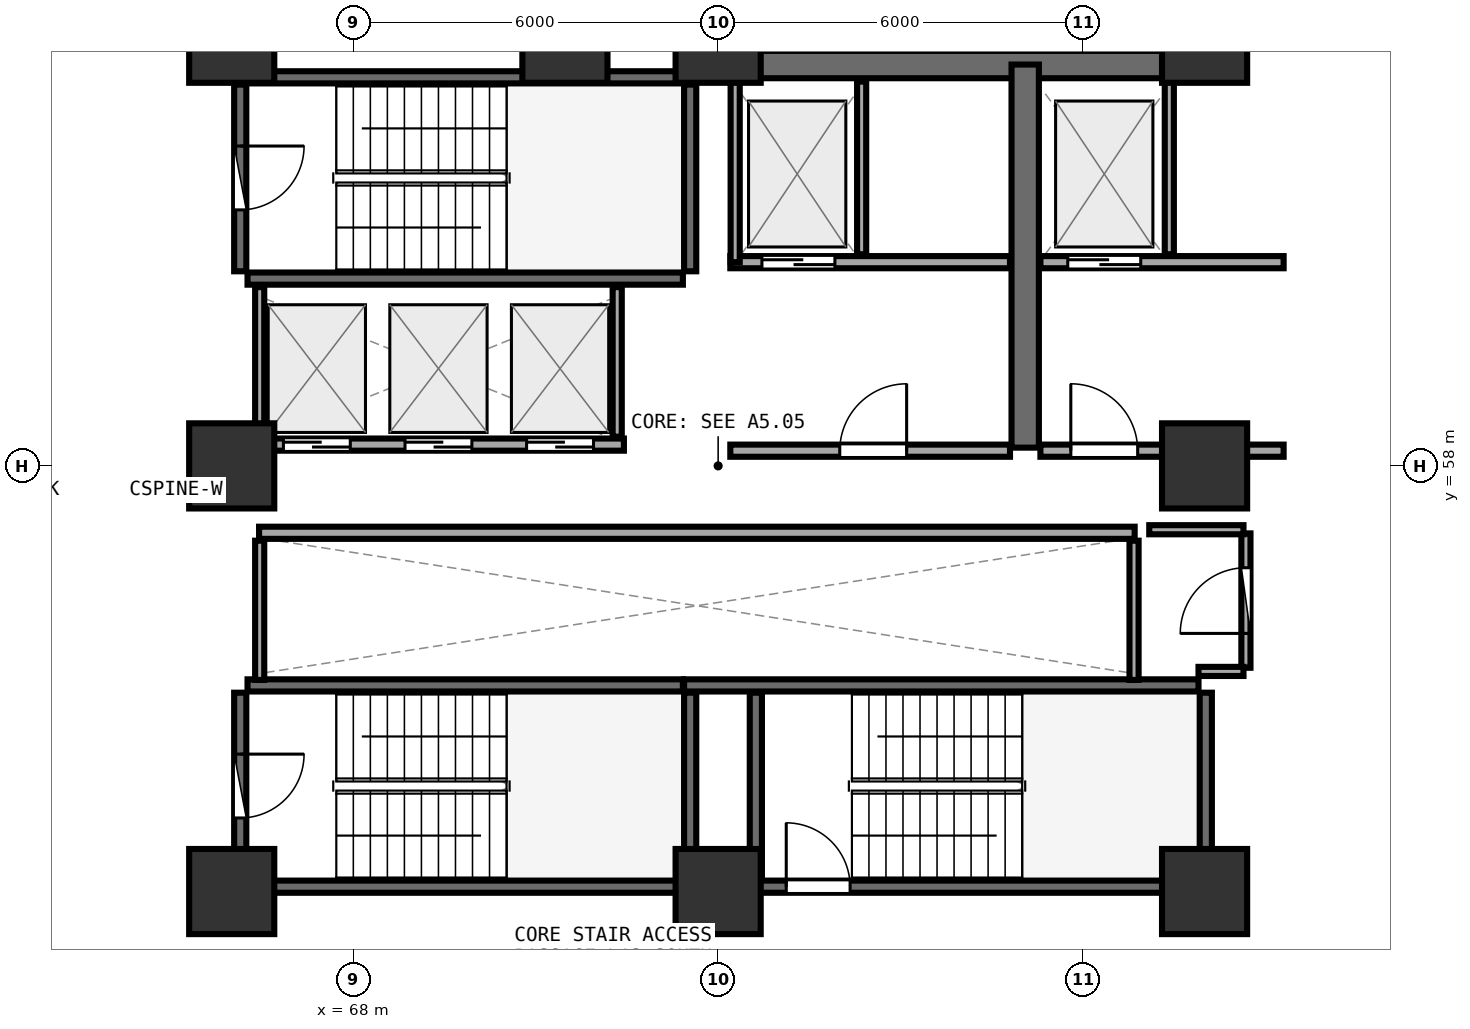
"""IFC4 building model, lengths in metres.
Left out: names, types, materials, properties, quantities, classifications, styles, units other than length and angle.
Written with IfcOpenShell. Run it as: python <this file> out.ifc"""

import sys

from ifc_helpers import new_model, si_unit, direction, frame, frame_2d, origin, origin_2d, place, context, subcontext, project, spatial, rectangle, extrude, element, fill, save


model = new_model("IFC4")
c1 = context("Model", 3, precision=1e-05, world=origin(), true_north=direction((0.0, 1.0)))
c2 = subcontext(c1, "Body", "Model", "MODEL_VIEW")
j1 = project(units=[si_unit("LENGTHUNIT", "METRE"), si_unit("PLANEANGLEUNIT", "RADIAN")], contexts=[c1])
p1 = place(None, origin())
s1 = spatial("IfcSite", under=j1, at=p1, CompositionType="ELEMENT")
p2 = place(p1, origin())
s2 = spatial("IfcBuilding", under=s1, at=p2, CompositionType="ELEMENT")
p3 = place(p2, frame((0.0, 0.0, 52.5)))
s3 = spatial("IfcBuildingStorey", under=s2, at=p3, CompositionType="ELEMENT", Elevation=52.5)
for number, where, z_axis, x_axis in (
    (1, (66.0, 51.0, 0.0), (0.0, 0.0, 1.0), (1.0, 0.0, 0.0)),
    (2, (74.0, 51.0, 0.0), (0.0, 0.0, 1.0), (1.0, 0.0, 0.0)),
    (3, (82.0, 51.0, 0.0), (0.0, 0.0, 1.0), (1.0, 0.0, 0.0)),
    (4, (82.0, 58.0, 0.0), (0.0, 0.0, 1.0), (1.0, 0.0, 0.0)),
    (5, (82.0, 65.0, 0.0), (0.0, 0.0, 1.0), (1.0, 0.0, 0.0)),
    (6, (74.0, 65.0, 0.0), (0.0, 0.0, 1.0), (1.0, 0.0, 0.0)),
    (7, (71.48, 65.0, 0.0), (0.0, 0.0, 1.0), (1.0, 0.0, 0.0)),
    (8, (66.0, 65.0, 0.0), (0.0, 0.0, 1.0), (1.0, 0.0, 0.0)),
    (9, (66.0, 58.0, 0.0), (0.0, 0.0, 1.0), (1.0, 0.0, 0.0)),
):
    element("IfcColumn", number, at=place(p3, frame(where, z_axis=z_axis, x_axis=x_axis)), inside=s3, PredefinedType="PILASTER", context=c2, shape_type="SweptSolid", body=[
        extrude(rectangle(XDim=1.4, YDim=1.4, at=origin_2d()), origin(), (0.0, 0.0, 1.0), 3.75),
    ])
p4 = place(p3, frame((66.26, 61.08, 0.0), z_axis=(0.0, 0.0, 1.0), x_axis=(1.0, 0.0, 0.0)))
e10 = element("IfcWall", 10, at=p4, inside=s3, PredefinedType="SHEAR", context=c2, shape_type="SweptSolid", body=[
    extrude(rectangle(XDim=7.16, YDim=0.2, at=frame_2d((3.58, 0.0))), origin(), (0.0, 0.0, 1.0), 3.49),
])
p5 = place(p3, frame((73.54, 61.2, 0.0), z_axis=(0.0, 0.0, 1.0), x_axis=(0.0, 1.0, 0.0)))
e11 = element("IfcWall", 11, at=p5, inside=s3, PredefinedType="SHEAR", context=c2, shape_type="SweptSolid", body=[
    extrude(rectangle(XDim=3.07, YDim=0.2, at=frame_2d((1.535, 0.0))), origin(), (0.0, 0.0, 1.0), 3.49),
])
p6 = place(p3, frame((73.42, 64.39, 0.0), z_axis=(0.0, 0.0, 1.0), x_axis=(-1.0, 0.0, 0.0)))
e12 = element("IfcWall", 12, at=p6, inside=s3, PredefinedType="SHEAR", context=c2, shape_type="SweptSolid", body=[
    extrude(rectangle(XDim=7.16, YDim=0.2, at=frame_2d((3.58, 0.0))), origin(), (0.0, 0.0, 1.0), 3.49),
])
p7 = place(p3, frame((66.14, 64.27, 0.0), z_axis=(0.0, 0.0, 1.0), x_axis=(0.0, -1.0, 0.0)))
e13 = element("IfcWall", 13, at=p7, inside=s3, PredefinedType="SHEAR", context=c2, shape_type="SweptSolid", body=[
    extrude(rectangle(XDim=3.07, YDim=0.2, at=frame_2d((1.535, 0.0))), origin(), (0.0, 0.0, 1.0), 3.49),
])
p8 = place(p7, frame((1.01, 0.0, 0.0)))
e14 = element("IfcOpeningElement", 14, at=p8, cuts=e13, PredefinedType="OPENING", context=c2, shape_type="SweptSolid", body=[
    extrude(rectangle(XDim=1.05, YDim=2.1, at=frame_2d((0.525, 1.05))), frame((0.0, 0.11, 0.0), z_axis=(0.0, -1.0, 0.0), x_axis=(1.0, 0.0, 0.0)), (0.0, 0.0, 1.0), 0.22),
])
p9 = place(p3, frame((74.0, 51.08, 0.0), z_axis=(0.0, 0.0, 1.0), x_axis=(1.0, 0.0, 0.0)))
e15 = element("IfcWall", 15, at=p9, inside=s3, PredefinedType="SHEAR", context=c2, shape_type="SweptSolid", body=[
    extrude(rectangle(XDim=7.9, YDim=0.2, at=frame_2d((3.95, 0.0))), origin(), (0.0, 0.0, 1.0), 3.49),
])
p10 = place(p9, frame((1.12, 0.0, 0.0)))
e16 = element("IfcOpeningElement", 16, at=p10, cuts=e15, PredefinedType="OPENING", context=c2, shape_type="SweptSolid", body=[
    extrude(rectangle(XDim=1.05, YDim=2.1, at=frame_2d((0.525, 1.05))), frame((0.0, 0.11, 0.0), z_axis=(0.0, -1.0, 0.0), x_axis=(1.0, 0.0, 0.0)), (0.0, 0.0, 1.0), 0.22),
])
p11 = place(p3, frame((82.02, 51.2, 0.0), z_axis=(0.0, 0.0, 1.0), x_axis=(0.0, 1.0, 0.0)))
e17 = element("IfcWall", 17, at=p11, inside=s3, PredefinedType="SHEAR", context=c2, shape_type="SweptSolid", body=[
    extrude(rectangle(XDim=3.07, YDim=0.2, at=frame_2d((1.535, 0.0))), origin(), (0.0, 0.0, 1.0), 3.49),
])
p12 = place(p3, frame((81.9, 54.39, 0.0), z_axis=(0.0, 0.0, 1.0), x_axis=(-1.0, 0.0, 0.0)))
e18 = element("IfcWall", 18, at=p12, inside=s3, PredefinedType="SHEAR", context=c2, shape_type="SweptSolid", body=[
    extrude(rectangle(XDim=8.46, YDim=0.2, at=frame_2d((4.23, 0.0))), origin(), (0.0, 0.0, 1.0), 3.49),
])
p13 = place(p3, frame((74.62, 54.27, 0.0), z_axis=(0.0, 0.0, 1.0), x_axis=(0.0, -1.0, 0.0)))
e19 = element("IfcWall", 19, at=p13, inside=s3, PredefinedType="SHEAR", context=c2, shape_type="SweptSolid", body=[
    extrude(rectangle(XDim=3.07, YDim=0.2, at=frame_2d((1.535, 0.0))), origin(), (0.0, 0.0, 1.0), 3.49),
])
p14 = place(p3, frame((66.26, 51.08, 0.0), z_axis=(0.0, 0.0, 1.0), x_axis=(1.0, 0.0, 0.0)))
e20 = element("IfcWall", 20, at=p14, inside=s3, PredefinedType="SHEAR", context=c2, shape_type="SweptSolid", body=[
    extrude(rectangle(XDim=7.16, YDim=0.2, at=frame_2d((3.58, 0.0))), origin(), (0.0, 0.0, 1.0), 3.49),
])
p15 = place(p3, frame((73.54, 51.2, 0.0), z_axis=(0.0, 0.0, 1.0), x_axis=(0.0, 1.0, 0.0)))
e21 = element("IfcWall", 21, at=p15, inside=s3, PredefinedType="SHEAR", context=c2, shape_type="SweptSolid", body=[
    extrude(rectangle(XDim=3.07, YDim=0.2, at=frame_2d((1.535, 0.0))), origin(), (0.0, 0.0, 1.0), 3.49),
])
p16 = place(p3, frame((73.42, 54.39, 0.0), z_axis=(0.0, 0.0, 1.0), x_axis=(-1.0, 0.0, 0.0)))
e22 = element("IfcWall", 22, at=p16, inside=s3, PredefinedType="SHEAR", context=c2, shape_type="SweptSolid", body=[
    extrude(rectangle(XDim=7.16, YDim=0.2, at=frame_2d((3.58, 0.0))), origin(), (0.0, 0.0, 1.0), 3.49),
])
p17 = place(p3, frame((66.14, 54.27, 0.0), z_axis=(0.0, 0.0, 1.0), x_axis=(0.0, -1.0, 0.0)))
e23 = element("IfcWall", 23, at=p17, inside=s3, PredefinedType="SHEAR", context=c2, shape_type="SweptSolid", body=[
    extrude(rectangle(XDim=3.07, YDim=0.2, at=frame_2d((1.535, 0.0))), origin(), (0.0, 0.0, 1.0), 3.49),
])
p18 = place(p17, frame((1.01, 0.0, 0.0)))
e24 = element("IfcOpeningElement", 24, at=p18, cuts=e23, PredefinedType="OPENING", context=c2, shape_type="SweptSolid", body=[
    extrude(rectangle(XDim=1.05, YDim=2.1, at=frame_2d((0.525, 1.05))), frame((0.0, 0.11, 0.0), z_axis=(0.0, -1.0, 0.0), x_axis=(1.0, 0.0, 0.0)), (0.0, 0.0, 1.0), 0.22),
])
p19 = place(p3, frame((74.0, 64.6, 0.0), z_axis=(0.0, 0.0, 1.0), x_axis=(1.0, 0.0, 0.0)))
e25 = element("IfcWall", 25, at=p19, inside=s3, PredefinedType="SHEAR", context=c2, shape_type="SweptSolid", body=[
    extrude(rectangle(XDim=8.0, YDim=0.45, at=frame_2d((4.0, 0.0))), origin(), (0.0, 0.0, 1.0), 3.49),
])
p20 = place(p3, frame((79.05, 58.3, 0.0), z_axis=(0.0, 0.0, 1.0), x_axis=(0.0, 1.0, 0.0)))
e26 = element("IfcWall", 26, at=p20, inside=s3, PredefinedType="SHEAR", context=c2, shape_type="SweptSolid", body=[
    extrude(rectangle(XDim=6.3, YDim=0.45, at=frame_2d((3.15, 0.0))), origin(), (0.0, 0.0, 1.0), 3.49),
])
p21 = place(p3, frame((74.2, 61.35, 0.0), z_axis=(0.0, 0.0, 1.0), x_axis=(1.0, 0.0, 0.0)))
e27 = element("IfcWall", 27, at=p21, inside=s3, PredefinedType="SOLIDWALL", context=c2, shape_type="SweptSolid", body=[
    extrude(rectangle(XDim=4.6, YDim=0.2, at=frame_2d((2.3, 0.0))), origin(), (0.0, 0.0, 1.0), 3.48),
])
p22 = place(p21, frame((0.52, 0.0, 0.0)))
e28 = element("IfcOpeningElement", 28, at=p22, cuts=e27, PredefinedType="OPENING", context=c2, shape_type="SweptSolid", body=[
    extrude(rectangle(XDim=1.2, YDim=2.15, at=frame_2d((0.6, 1.075))), frame((0.0, 0.11, 0.0), z_axis=(0.0, -1.0, 0.0), x_axis=(1.0, 0.0, 0.0)), (0.0, 0.0, 1.0), 0.22),
])
p23 = place(p3, frame((74.28, 61.35, 0.0), z_axis=(0.0, 0.0, 1.0), x_axis=(0.0, 1.0, 0.0)))
e29 = element("IfcWall", 29, at=p23, inside=s3, PredefinedType="PARTITIONING", context=c2, shape_type="SweptSolid", body=[
    extrude(rectangle(XDim=2.97, YDim=0.15, at=frame_2d((1.485, 0.0))), origin(), (0.0, 0.0, 1.0), 3.48),
])
p24 = place(p3, frame((76.36, 61.48, 0.0), z_axis=(0.0, 0.0, 1.0), x_axis=(0.0, 1.0, 0.0)))
e30 = element("IfcWall", 30, at=p24, inside=s3, PredefinedType="PARTITIONING", context=c2, shape_type="SweptSolid", body=[
    extrude(rectangle(XDim=2.84, YDim=0.15, at=frame_2d((1.42, 0.0))), origin(), (0.0, 0.0, 1.0), 3.48),
])
p25 = place(p3, frame((79.3, 61.35, 0.0), z_axis=(0.0, 0.0, 1.0), x_axis=(1.0, 0.0, 0.0)))
e31 = element("IfcWall", 31, at=p25, inside=s3, PredefinedType="SOLIDWALL", context=c2, shape_type="SweptSolid", body=[
    extrude(rectangle(XDim=4.0, YDim=0.2, at=frame_2d((2.0, 0.0))), origin(), (0.0, 0.0, 1.0), 2.775),
])
p26 = place(p25, frame((0.45, 0.0, 0.0)))
e32 = element("IfcOpeningElement", 32, at=p26, cuts=e31, PredefinedType="OPENING", context=c2, shape_type="SweptSolid", body=[
    extrude(rectangle(XDim=1.2, YDim=2.15, at=frame_2d((0.6, 1.075))), frame((0.0, 0.11, 0.0), z_axis=(0.0, -1.0, 0.0), x_axis=(1.0, 0.0, 0.0)), (0.0, 0.0, 1.0), 0.22),
])
p27 = place(p3, frame((81.42, 61.48, 0.0), z_axis=(0.0, 0.0, 1.0), x_axis=(0.0, 1.0, 0.0)))
e33 = element("IfcWall", 33, at=p27, inside=s3, PredefinedType="PARTITIONING", context=c2, shape_type="SweptSolid", body=[
    extrude(rectangle(XDim=2.84, YDim=0.15, at=frame_2d((1.42, 0.0))), origin(), (0.0, 0.0, 1.0), 3.48),
])
p28 = place(p3, frame((74.2, 58.25, 0.0), z_axis=(0.0, 0.0, 1.0), x_axis=(1.0, 0.0, 0.0)))
e34 = element("IfcWall", 34, at=p28, inside=s3, PredefinedType="SOLIDWALL", context=c2, shape_type="SweptSolid", body=[
    extrude(rectangle(XDim=4.6, YDim=0.2, at=frame_2d((2.3, 0.0))), origin(), (0.0, 0.0, 1.0), 3.48),
])
p29 = place(p28, frame((1.8, 0.0, 0.0)))
e35 = element("IfcOpeningElement", 35, at=p29, cuts=e34, PredefinedType="OPENING", context=c2, shape_type="SweptSolid", body=[
    extrude(rectangle(XDim=1.1, YDim=2.1, at=frame_2d((0.55, 1.05))), frame((0.0, 0.11, 0.0), z_axis=(0.0, -1.0, 0.0), x_axis=(1.0, 0.0, 0.0)), (0.0, 0.0, 1.0), 0.22),
])
p30 = place(p3, frame((79.3, 58.25, 0.0), z_axis=(0.0, 0.0, 1.0), x_axis=(1.0, 0.0, 0.0)))
e36 = element("IfcWall", 36, at=p30, inside=s3, PredefinedType="SOLIDWALL", context=c2, shape_type="SweptSolid", body=[
    extrude(rectangle(XDim=4.0, YDim=0.2, at=frame_2d((2.0, 0.0))), origin(), (0.0, 0.0, 1.0), 2.775),
])
p31 = place(p30, frame((0.5, 0.0, 0.0)))
e37 = element("IfcOpeningElement", 37, at=p31, cuts=e36, PredefinedType="OPENING", context=c2, shape_type="SweptSolid", body=[
    extrude(rectangle(XDim=1.1, YDim=2.1, at=frame_2d((0.55, 1.05))), frame((0.0, 0.11, 0.0), z_axis=(0.0, -1.0, 0.0), x_axis=(1.0, 0.0, 0.0)), (0.0, 0.0, 1.0), 0.22),
])
p32 = place(p3, frame((66.45, 58.35, 0.0), z_axis=(0.0, 0.0, 1.0), x_axis=(1.0, 0.0, 0.0)))
e38 = element("IfcWall", 38, at=p32, inside=s3, PredefinedType="SOLIDWALL", context=c2, shape_type="SweptSolid", body=[
    extrude(rectangle(XDim=6.0, YDim=0.2, at=frame_2d((3.0, 0.0))), origin(), (0.0, 0.0, 1.0), 3.48),
])
p33 = place(p32, frame((0.4, 0.0, 0.0)))
e39 = element("IfcOpeningElement", 39, at=p33, cuts=e38, PredefinedType="OPENING", context=c2, shape_type="SweptSolid", body=[
    extrude(rectangle(XDim=1.1, YDim=2.1, at=frame_2d((0.55, 1.05))), frame((0.0, 0.11, 0.0), z_axis=(0.0, -1.0, 0.0), x_axis=(1.0, 0.0, 0.0)), (0.0, 0.0, 1.0), 0.22),
])
p34 = place(p32, frame((2.4, 0.0, 0.0)))
e40 = element("IfcOpeningElement", 40, at=p34, cuts=e38, PredefinedType="OPENING", context=c2, shape_type="SweptSolid", body=[
    extrude(rectangle(XDim=1.1, YDim=2.1, at=frame_2d((0.55, 1.05))), frame((0.0, 0.11, 0.0), z_axis=(0.0, -1.0, 0.0), x_axis=(1.0, 0.0, 0.0)), (0.0, 0.0, 1.0), 0.22),
])
p35 = place(p32, frame((4.4, 0.0, 0.0)))
e41 = element("IfcOpeningElement", 41, at=p35, cuts=e38, PredefinedType="OPENING", context=c2, shape_type="SweptSolid", body=[
    extrude(rectangle(XDim=1.1, YDim=2.1, at=frame_2d((0.55, 1.05))), frame((0.0, 0.11, 0.0), z_axis=(0.0, -1.0, 0.0), x_axis=(1.0, 0.0, 0.0)), (0.0, 0.0, 1.0), 0.22),
])
for number, where, z_axis, x_axis in (
    (42, (66.46, 58.48, 0.0), (0.0, 0.0, 1.0), (0.0, 1.0, 0.0)),
    (43, (72.34, 58.48, 0.0), (0.0, 0.0, 1.0), (0.0, 1.0, 0.0)),
):
    element("IfcWall", number, at=place(p3, frame(where, z_axis=z_axis, x_axis=x_axis)), inside=s3, PredefinedType="PARTITIONING", context=c2, shape_type="SweptSolid", body=[
        extrude(rectangle(XDim=2.46, YDim=0.15, at=frame_2d((1.23, 0.0))), origin(), (0.0, 0.0, 1.0), 3.48),
    ])
p36 = place(p3, frame((66.45, 56.9, 0.0), z_axis=(0.0, 0.0, 1.0), x_axis=(1.0, 0.0, 0.0)))
e44 = element("IfcWall", 44, at=p36, inside=s3, PredefinedType="SOLIDWALL", context=c2, shape_type="SweptSolid", body=[
    extrude(rectangle(XDim=14.4, YDim=0.2, at=frame_2d((7.2, 0.0))), origin(), (0.0, 0.0, 1.0), 3.48),
])
for number, where, z_axis, x_axis in (
    (45, (66.46, 54.48, 0.0), (0.0, 0.0, 1.0), (0.0, 1.0, 0.0)),
    (46, (80.84, 54.48, 0.0), (0.0, 0.0, 1.0), (0.0, 1.0, 0.0)),
):
    element("IfcWall", number, at=place(p3, frame(where, z_axis=z_axis, x_axis=x_axis)), inside=s3, PredefinedType="PARTITIONING", context=c2, shape_type="SweptSolid", body=[
        extrude(rectangle(XDim=2.29, YDim=0.15, at=frame_2d((1.145, 0.0))), origin(), (0.0, 0.0, 1.0), 3.48),
    ])
p37 = place(p3, frame((82.68, 54.68, 0.0), z_axis=(0.0, 0.0, 1.0), x_axis=(0.0, 1.0, 0.0)))
e47 = element("IfcWall", 47, at=p37, inside=s3, PredefinedType="PARTITIONING", context=c2, shape_type="SweptSolid", body=[
    extrude(rectangle(XDim=2.21, YDim=0.15, at=frame_2d((1.105, 0.0))), origin(), (0.0, 0.0, 1.0), 3.48),
])
p38 = place(p37, frame((0.565, 0.0, 0.0)))
e48 = element("IfcOpeningElement", 48, at=p38, cuts=e47, PredefinedType="OPENING", context=c2, shape_type="SweptSolid", body=[
    extrude(rectangle(XDim=1.08, YDim=2.1, at=frame_2d((0.54, 1.05))), frame((0.0, 0.085, 0.0), z_axis=(0.0, -1.0, 0.0), x_axis=(1.0, 0.0, 0.0)), (0.0, 0.0, 1.0), 0.17),
])
p39 = place(p3, frame((61.499, 50.454, 0.0), z_axis=(0.0, 0.0, 1.0), x_axis=(0.747393415848, -0.664381729089, 0.0)))
e49 = element("IfcWall", 49, at=p39, inside=s3, PredefinedType="PARTITIONING", context=c2, shape_type="SweptSolid", body=[
    extrude(rectangle(XDim=5.929, YDim=0.12, at=frame_2d((2.965, 0.0))), origin(), (0.0, 0.0, 1.0), 2.875),
])
p40 = place(p39, frame((2.515, 0.0, 0.0)))
e50 = element("IfcOpeningElement", 50, at=p40, cuts=e49, PredefinedType="OPENING", context=c2, shape_type="SweptSolid", body=[
    extrude(rectangle(XDim=0.9, YDim=2.08, at=frame_2d((0.45, 1.04))), frame((0.0, 0.07, 0.0), z_axis=(0.0, -1.0, 0.0), x_axis=(1.0, 0.0, 0.0)), (0.0, 0.0, 1.0), 0.14),
])
p41 = place(p3, frame((84.895, 48.628, 0.0), z_axis=(0.0, 0.0, 1.0), x_axis=(0.560933949984, 0.827860558159, 0.0)))
e51 = element("IfcWall", 51, at=p41, inside=s3, PredefinedType="PARTITIONING", context=c2, shape_type="SweptSolid", body=[
    extrude(rectangle(XDim=5.788, YDim=0.12, at=frame_2d((2.894, 0.0))), origin(), (0.0, 0.0, 1.0), 2.875),
])
p42 = place(p41, frame((2.444, 0.0, 0.0)))
e52 = element("IfcOpeningElement", 52, at=p42, cuts=e51, PredefinedType="OPENING", context=c2, shape_type="SweptSolid", body=[
    extrude(rectangle(XDim=0.9, YDim=2.08, at=frame_2d((0.45, 1.04))), frame((0.0, 0.07, 0.0), z_axis=(0.0, -1.0, 0.0), x_axis=(1.0, 0.0, 0.0)), (0.0, 0.0, 1.0), 0.14),
])
p43 = place(p3, frame((81.9, 54.62, 0.0), z_axis=(0.0, 0.0, 1.0), x_axis=(1.0, 0.0, 0.0)))
e53 = element("IfcWall", 53, at=p43, inside=s3, PredefinedType="PARTITIONING", context=c2, shape_type="SweptSolid", body=[
    extrude(rectangle(XDim=0.74, YDim=0.15, at=frame_2d((0.37, 0.0))), origin(), (0.0, 0.0, 1.0), 2.775),
])
p44 = place(p3, frame((82.64, 56.95, 0.0), z_axis=(0.0, 0.0, 1.0), x_axis=(-1.0, 0.0, 0.0)))
e54 = element("IfcWall", 54, at=p44, inside=s3, PredefinedType="PARTITIONING", context=c2, shape_type="SweptSolid", body=[
    extrude(rectangle(XDim=1.55, YDim=0.15, at=frame_2d((0.775, 0.0))), origin(), (0.0, 0.0, 1.0), 2.775),
])
p45 = place(p8, origin())
e55 = element("IfcDoor", 55, at=p45, inside=s3, OperationType="SINGLE_SWING_LEFT", PredefinedType="DOOR", context=c2, shape_type="SweptSolid", body=[
    extrude(rectangle(XDim=1.05, YDim=2.1, at=frame_2d((0.525, 1.05))), frame((0.0, 0.025, 0.0), z_axis=(0.0, -1.0, 0.0), x_axis=(1.0, 0.0, 0.0)), (0.0, 0.0, 1.0), 0.05),
])
fill(e14, e55)
p46 = place(p10, origin())
e56 = element("IfcDoor", 56, at=p46, inside=s3, OperationType="SINGLE_SWING_LEFT", PredefinedType="DOOR", context=c2, shape_type="SweptSolid", body=[
    extrude(rectangle(XDim=1.05, YDim=2.1, at=frame_2d((0.525, 1.05))), frame((0.0, 0.025, 0.0), z_axis=(0.0, -1.0, 0.0), x_axis=(1.0, 0.0, 0.0)), (0.0, 0.0, 1.0), 0.05),
])
fill(e16, e56)
p47 = place(p18, origin())
e57 = element("IfcDoor", 57, at=p47, inside=s3, OperationType="SINGLE_SWING_LEFT", PredefinedType="DOOR", context=c2, shape_type="SweptSolid", body=[
    extrude(rectangle(XDim=1.05, YDim=2.1, at=frame_2d((0.525, 1.05))), frame((0.0, 0.025, 0.0), z_axis=(0.0, -1.0, 0.0), x_axis=(1.0, 0.0, 0.0)), (0.0, 0.0, 1.0), 0.05),
])
fill(e24, e57)
p48 = place(p22, origin())
e58 = element("IfcDoor", 58, at=p48, inside=s3, OperationType="DOUBLE_DOOR_SLIDING", PredefinedType="DOOR", context=c2, shape_type="SweptSolid", body=[
    extrude(rectangle(XDim=1.2, YDim=2.15, at=frame_2d((0.6, 1.075))), frame((0.0, 0.025, 0.0), z_axis=(0.0, -1.0, 0.0), x_axis=(1.0, 0.0, 0.0)), (0.0, 0.0, 1.0), 0.05),
])
fill(e28, e58)
p49 = place(p26, origin())
e59 = element("IfcDoor", 59, at=p49, inside=s3, OperationType="DOUBLE_DOOR_SLIDING", PredefinedType="DOOR", context=c2, shape_type="SweptSolid", body=[
    extrude(rectangle(XDim=1.2, YDim=2.15, at=frame_2d((0.6, 1.075))), frame((0.0, 0.025, 0.0), z_axis=(0.0, -1.0, 0.0), x_axis=(1.0, 0.0, 0.0)), (0.0, 0.0, 1.0), 0.05),
])
fill(e32, e59)
p50 = place(p29, frame((1.1, 0.0, 0.0), z_axis=(0.0, 0.0, 1.0), x_axis=(-1.0, 0.0, 0.0)))
e60 = element("IfcDoor", 60, at=p50, inside=s3, OperationType="SINGLE_SWING_LEFT", PredefinedType="DOOR", context=c2, shape_type="SweptSolid", body=[
    extrude(rectangle(XDim=1.1, YDim=2.1, at=frame_2d((0.55, 1.05))), frame((0.0, 0.025, 0.0), z_axis=(0.0, -1.0, 0.0), x_axis=(1.0, 0.0, 0.0)), (0.0, 0.0, 1.0), 0.05),
])
fill(e35, e60)
p51 = place(p31, frame((1.1, 0.0, 0.0), z_axis=(0.0, 0.0, 1.0), x_axis=(-1.0, 0.0, 0.0)))
e61 = element("IfcDoor", 61, at=p51, inside=s3, OperationType="SINGLE_SWING_RIGHT", PredefinedType="DOOR", context=c2, shape_type="SweptSolid", body=[
    extrude(rectangle(XDim=1.1, YDim=2.1, at=frame_2d((0.55, 1.05))), frame((0.0, 0.025, 0.0), z_axis=(0.0, -1.0, 0.0), x_axis=(1.0, 0.0, 0.0)), (0.0, 0.0, 1.0), 0.05),
])
fill(e37, e61)
p52 = place(p33, origin())
e62 = element("IfcDoor", 62, at=p52, inside=s3, OperationType="DOUBLE_DOOR_SLIDING", PredefinedType="DOOR", context=c2, shape_type="SweptSolid", body=[
    extrude(rectangle(XDim=1.1, YDim=2.1, at=frame_2d((0.55, 1.05))), frame((0.0, 0.025, 0.0), z_axis=(0.0, -1.0, 0.0), x_axis=(1.0, 0.0, 0.0)), (0.0, 0.0, 1.0), 0.05),
])
fill(e39, e62)
p53 = place(p34, origin())
e63 = element("IfcDoor", 63, at=p53, inside=s3, OperationType="DOUBLE_DOOR_SLIDING", PredefinedType="DOOR", context=c2, shape_type="SweptSolid", body=[
    extrude(rectangle(XDim=1.1, YDim=2.1, at=frame_2d((0.55, 1.05))), frame((0.0, 0.025, 0.0), z_axis=(0.0, -1.0, 0.0), x_axis=(1.0, 0.0, 0.0)), (0.0, 0.0, 1.0), 0.05),
])
fill(e40, e63)
p54 = place(p35, origin())
e64 = element("IfcDoor", 64, at=p54, inside=s3, OperationType="DOUBLE_DOOR_SLIDING", PredefinedType="DOOR", context=c2, shape_type="SweptSolid", body=[
    extrude(rectangle(XDim=1.1, YDim=2.1, at=frame_2d((0.55, 1.05))), frame((0.0, 0.025, 0.0), z_axis=(0.0, -1.0, 0.0), x_axis=(1.0, 0.0, 0.0)), (0.0, 0.0, 1.0), 0.05),
])
fill(e41, e64)
p55 = place(p38, origin())
e65 = element("IfcDoor", 65, at=p55, inside=s3, OperationType="SINGLE_SWING_LEFT", PredefinedType="DOOR", context=c2, shape_type="SweptSolid", body=[
    extrude(rectangle(XDim=1.08, YDim=2.1, at=frame_2d((0.54, 1.05))), frame((0.0, 0.025, 0.0), z_axis=(0.0, -1.0, 0.0), x_axis=(1.0, 0.0, 0.0)), (0.0, 0.0, 1.0), 0.05),
])
fill(e48, e65)
save(model, sys.argv[1])
